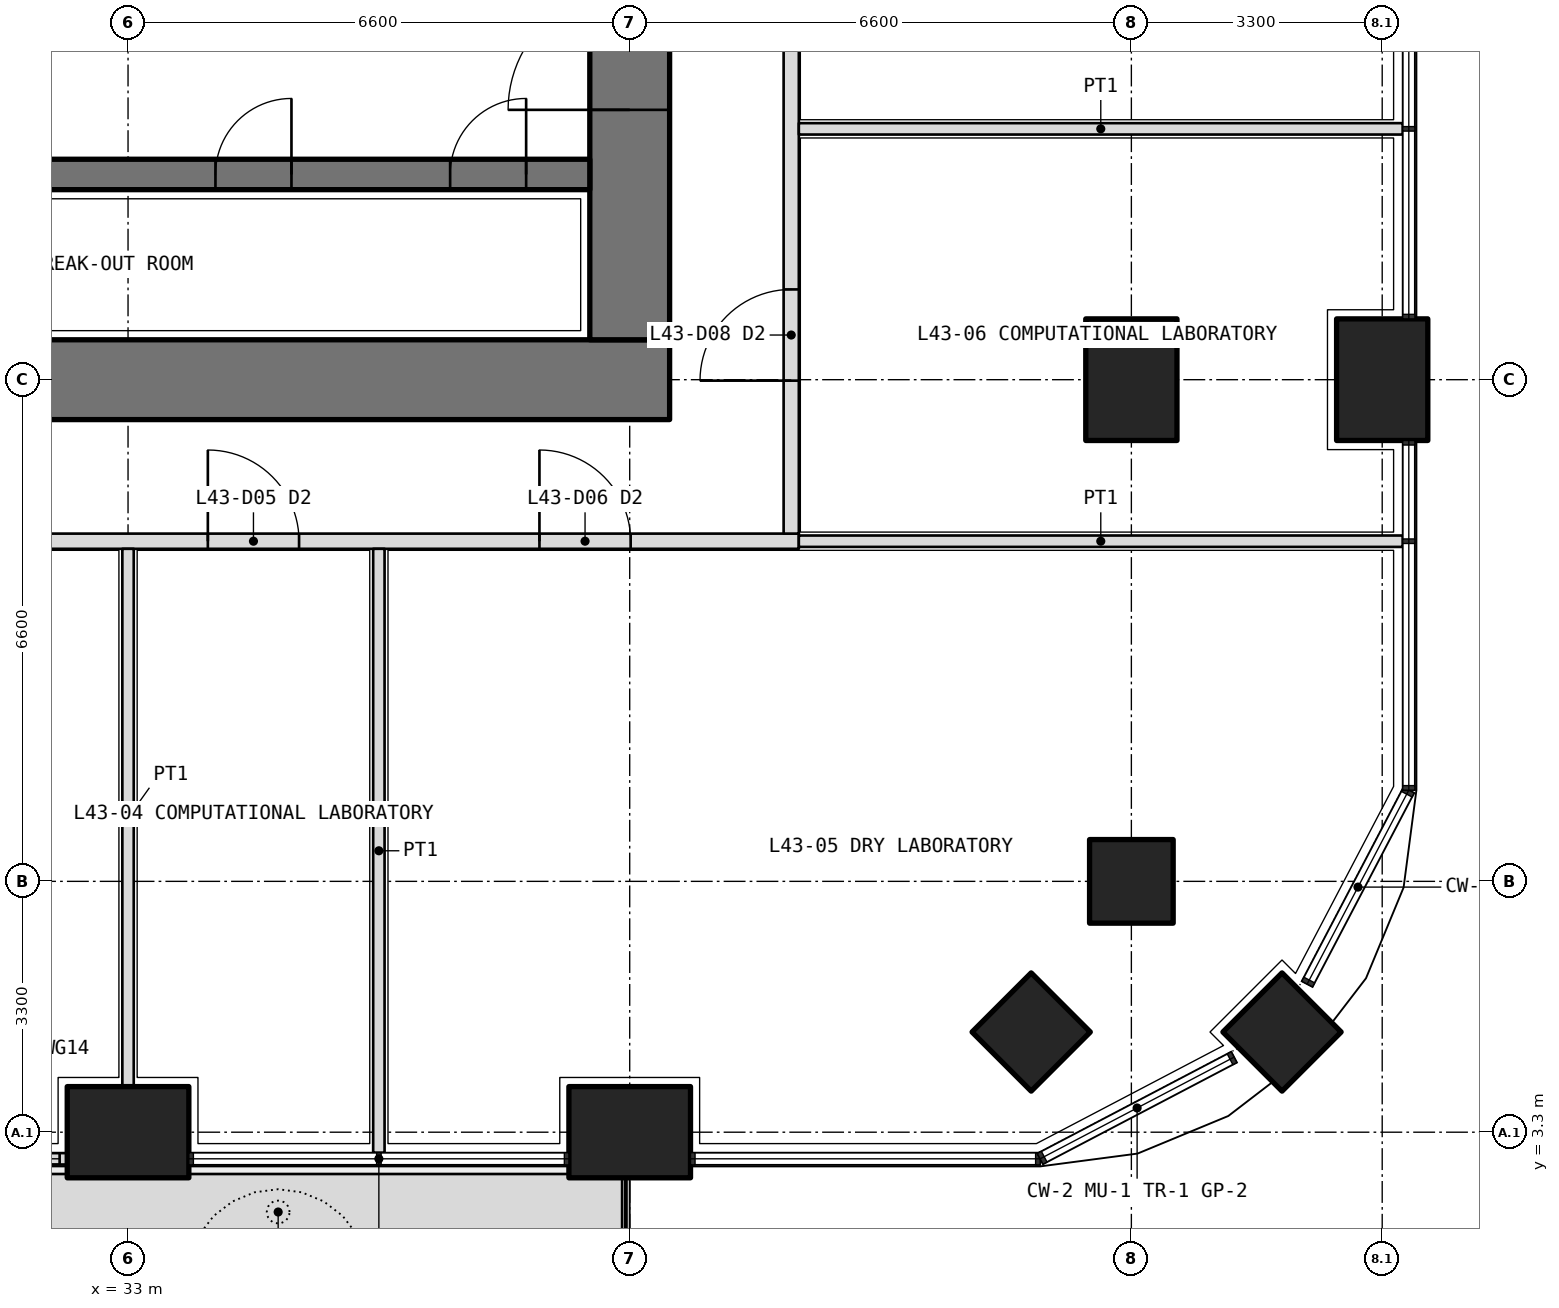
"""IFC4 building model, lengths in metres.
Left out: names, types, materials, properties, quantities, classifications, styles, units other than length and angle.
Written with IfcOpenShell. Run it as: python <this file> out.ifc"""

import sys

from ifc_helpers import new_model, si_unit, direction, frame, frame_2d, origin, origin_2d, place, context, subcontext, project, spatial, polyline, rectangle, outline, extrude, element, fill, save


model = new_model("IFC4")
c1 = context("Model", 3, precision=1e-05, world=origin(), true_north=direction((0.0, 1.0)))
c2 = subcontext(c1, "Body", "Model", "MODEL_VIEW")
j1 = project(units=[si_unit("LENGTHUNIT", "METRE"), si_unit("PLANEANGLEUNIT", "RADIAN")], contexts=[c1])
p1 = place(None, origin())
s1 = spatial("IfcSite", under=j1, at=p1, CompositionType="ELEMENT")
p2 = place(p1, origin())
s2 = spatial("IfcBuilding", under=s1, at=p2, CompositionType="ELEMENT")
p3 = place(p2, frame((0.0, 0.0, 189.3)))
s3 = spatial("IfcBuildingStorey", under=s2, at=p3, CompositionType="ELEMENT", Elevation=189.3)
p4 = place(p3, frame((48.182, 4.618, 0.0), z_axis=(0.0, 0.0, 1.0), x_axis=(0.707106781187, 0.707106781187, 0.0)))
e1 = element("IfcColumn", 1, at=p4, inside=s3, PredefinedType="COLUMN", context=c2, shape_type="SweptSolid", body=[
    extrude(rectangle(XDim=1.1, YDim=1.1, at=origin_2d()), origin(), (0.0, 0.0, 1.0), 4.2),
])
for number, where, z_axis, x_axis in (
    (2, (33.0, 3.3, 0.0), (0.0, 0.0, 1.0), (1.0, 0.0, 0.0)),
    (3, (39.6, 3.3, 0.0), (0.0, 0.0, 1.0), (1.0, 0.0, 0.0)),
    (4, (49.5, 13.2, 0.0), (0.0, 0.0, 1.0), (0.0, 1.0, 0.0)),
):
    element("IfcColumn", number, at=place(p3, frame(where, z_axis=z_axis, x_axis=x_axis)), inside=s3, PredefinedType="COLUMN", context=c2, shape_type="SweptSolid", body=[
        extrude(rectangle(XDim=1.6, YDim=1.2, at=origin_2d()), origin(), (0.0, 0.0, 1.0), 4.2),
    ])
for number, where, z_axis, x_axis in (
    (5, (46.2, 6.6, 0.0), (0.0, 0.0, 1.0), (1.0, 0.0, 0.0)),
    (6, (44.882, 4.618, 0.0), (0.0, 0.0, 1.0), (0.707, 0.707, 0.0)),
):
    element("IfcColumn", number, at=place(p3, frame(where, z_axis=z_axis, x_axis=x_axis)), inside=s3, PredefinedType="COLUMN", context=c2, shape_type="SweptSolid", body=[
        extrude(rectangle(XDim=1.1, YDim=1.1, at=origin_2d()), origin(), (0.0, 0.0, 1.0), 4.2),
    ])
p5 = place(p3, frame((46.2, 13.2, 0.0), z_axis=(0.0, 0.0, 1.0), x_axis=(0.0, 1.0, 0.0)))
e7 = element("IfcColumn", 7, at=p5, inside=s3, PredefinedType="COLUMN", context=c2, shape_type="SweptSolid", body=[
    extrude(rectangle(XDim=1.6, YDim=1.2, at=origin_2d()), origin(), (0.0, 0.0, 1.0), 4.2),
])
p6 = place(p3, origin())
e8 = element("IfcWall", 8, at=p6, inside=s3, PredefinedType="USERDEFINED", context=c2, shape_type="SweptSolid", body=[
    extrude(outline(polyline([(30.45, 1.75), (39.5, 1.75), (39.5, 2.75), (30.45, 2.75), (30.45, 1.75)]), holes=[polyline([(30.6, 1.9), (39.35, 1.9), (39.35, 2.6), (30.6, 2.6), (30.6, 1.9)])]), origin(), (0.0, 0.0, 1.0), 1.05),
])
p7 = place(p3, frame((27.2, 2.95, 0.0), z_axis=(0.0, 0.0, 1.0), x_axis=(1.0, 0.0, 0.0)))
e9 = element("IfcWall", 9, at=p7, inside=s3, PredefinedType="SOLIDWALL", context=c2, shape_type="SweptSolid", body=[
    extrude(rectangle(XDim=5.0, YDim=0.15, at=frame_2d((2.5, 0.0))), origin(), (0.0, 0.0, 1.0), 2.7),
])
p8 = place(p7, frame((2.75, 0.0, 0.0)))
e10 = element("IfcOpeningElement", 10, at=p8, cuts=e9, PredefinedType="OPENING", context=c2, shape_type="SweptSolid", body=[
    extrude(rectangle(XDim=1.0, YDim=2.4, at=frame_2d((0.5, 1.2))), frame((0.0, 0.085, 0.0), z_axis=(0.0, -1.0, 0.0), x_axis=(1.0, 0.0, 0.0)), (0.0, 0.0, 1.0), 0.17),
])
p9 = place(p7, frame((0.1, 0.0, 0.1)))
e11 = element("IfcOpeningElement", 11, at=p9, cuts=e9, PredefinedType="OPENING", context=c2, shape_type="SweptSolid", body=[
    extrude(rectangle(XDim=2.15, YDim=2.3, at=frame_2d((1.075, 1.15))), frame((0.0, 0.085, 0.0), z_axis=(0.0, -1.0, 0.0), x_axis=(1.0, 0.0, 0.0)), (0.0, 0.0, 1.0), 0.17),
])
p10 = place(p7, frame((3.85, 0.0, 0.1)))
e12 = element("IfcOpeningElement", 12, at=p10, cuts=e9, PredefinedType="OPENING", context=c2, shape_type="SweptSolid", body=[
    extrude(rectangle(XDim=1.05, YDim=2.3, at=frame_2d((0.525, 1.15))), frame((0.0, 0.085, 0.0), z_axis=(0.0, -1.0, 0.0), x_axis=(1.0, 0.0, 0.0)), (0.0, 0.0, 1.0), 0.17),
])
p11 = place(p3, frame((12.675, 13.2, 0.0), z_axis=(0.0, 0.0, 1.0), x_axis=(1.0, 0.0, 0.0)))
e13 = element("IfcWall", 13, at=p11, inside=s3, PredefinedType="SHEAR", context=c2, shape_type="SweptSolid", body=[
    extrude(rectangle(XDim=27.45, YDim=1.05, at=frame_2d((13.725, 0.0))), origin(), (0.0, 0.0, 1.0), 4.2),
])
p12 = place(p3, frame((39.6, 13.725, 0.0), z_axis=(0.0, 0.0, 1.0), x_axis=(0.0, 1.0, 0.0)))
e14 = element("IfcWall", 14, at=p12, inside=s3, PredefinedType="SHEAR", context=c2, shape_type="SweptSolid", body=[
    extrude(rectangle(XDim=18.75, YDim=1.05, at=frame_2d((9.375, 0.0))), origin(), (0.0, 0.0, 1.0), 4.2),
])
p13 = place(p12, frame((3.025, 0.0, 0.0)))
e15 = element("IfcOpeningElement", 15, at=p13, cuts=e14, PredefinedType="OPENING", context=c2, shape_type="SweptSolid", body=[
    extrude(rectangle(XDim=1.6, YDim=2.1, at=frame_2d((0.8, 1.05))), frame((0.0, 0.535, 0.0), z_axis=(0.0, -1.0, 0.0), x_axis=(1.0, 0.0, 0.0)), (0.0, 0.0, 1.0), 1.07),
])
p14 = place(p12, frame((13.825, 0.0, 0.0)))
e16 = element("IfcOpeningElement", 16, at=p14, cuts=e14, PredefinedType="OPENING", context=c2, shape_type="SweptSolid", body=[
    extrude(rectangle(XDim=1.6, YDim=2.1, at=frame_2d((0.8, 1.05))), frame((0.0, 0.535, 0.0), z_axis=(0.0, -1.0, 0.0), x_axis=(1.0, 0.0, 0.0)), (0.0, 0.0, 1.0), 1.07),
])
p15 = place(p3, frame((13.725, 15.9, 0.0), z_axis=(0.0, 0.0, 1.0), x_axis=(1.0, 0.0, 0.0)))
e17 = element("IfcWall", 17, at=p15, inside=s3, PredefinedType="SHEAR", context=c2, shape_type="SweptSolid", body=[
    extrude(rectangle(XDim=25.35, YDim=0.4, at=frame_2d((12.675, 0.0))), origin(), (0.0, 0.0, 1.0), 4.2),
])
p16 = place(p15, frame((0.837, 0.0, 0.0)))
e18 = element("IfcOpeningElement", 18, at=p16, cuts=e17, PredefinedType="OPENING", context=c2, shape_type="SweptSolid", body=[
    extrude(rectangle(XDim=1.0, YDim=2.1, at=frame_2d((0.5, 1.05))), frame((0.0, 0.21, 0.0), z_axis=(0.0, -1.0, 0.0), x_axis=(1.0, 0.0, 0.0)), (0.0, 0.0, 1.0), 0.42),
])
p17 = place(p15, frame((3.925, 0.0, 0.0)))
e19 = element("IfcOpeningElement", 19, at=p17, cuts=e17, PredefinedType="OPENING", context=c2, shape_type="SweptSolid", body=[
    extrude(rectangle(XDim=1.0, YDim=2.1, at=frame_2d((0.5, 1.05))), frame((0.0, 0.21, 0.0), z_axis=(0.0, -1.0, 0.0), x_axis=(1.0, 0.0, 0.0)), (0.0, 0.0, 1.0), 0.42),
])
p18 = place(p15, frame((7.225, 0.0, 0.0)))
e20 = element("IfcOpeningElement", 20, at=p18, cuts=e17, PredefinedType="OPENING", context=c2, shape_type="SweptSolid", body=[
    extrude(rectangle(XDim=1.0, YDim=2.1, at=frame_2d((0.5, 1.05))), frame((0.0, 0.21, 0.0), z_axis=(0.0, -1.0, 0.0), x_axis=(1.0, 0.0, 0.0)), (0.0, 0.0, 1.0), 0.42),
])
p19 = place(p15, frame((10.525, 0.0, 0.0)))
e21 = element("IfcOpeningElement", 21, at=p19, cuts=e17, PredefinedType="OPENING", context=c2, shape_type="SweptSolid", body=[
    extrude(rectangle(XDim=1.0, YDim=2.1, at=frame_2d((0.5, 1.05))), frame((0.0, 0.21, 0.0), z_axis=(0.0, -1.0, 0.0), x_axis=(1.0, 0.0, 0.0)), (0.0, 0.0, 1.0), 0.42),
])
p20 = place(p15, frame((13.825, 0.0, 0.0)))
e22 = element("IfcOpeningElement", 22, at=p20, cuts=e17, PredefinedType="OPENING", context=c2, shape_type="SweptSolid", body=[
    extrude(rectangle(XDim=1.0, YDim=2.1, at=frame_2d((0.5, 1.05))), frame((0.0, 0.21, 0.0), z_axis=(0.0, -1.0, 0.0), x_axis=(1.0, 0.0, 0.0)), (0.0, 0.0, 1.0), 0.42),
])
p21 = place(p15, frame((17.125, 0.0, 0.0)))
e23 = element("IfcOpeningElement", 23, at=p21, cuts=e17, PredefinedType="OPENING", context=c2, shape_type="SweptSolid", body=[
    extrude(rectangle(XDim=1.0, YDim=2.1, at=frame_2d((0.5, 1.05))), frame((0.0, 0.21, 0.0), z_axis=(0.0, -1.0, 0.0), x_axis=(1.0, 0.0, 0.0)), (0.0, 0.0, 1.0), 0.42),
])
p22 = place(p15, frame((20.425, 0.0, 0.0)))
e24 = element("IfcOpeningElement", 24, at=p22, cuts=e17, PredefinedType="OPENING", context=c2, shape_type="SweptSolid", body=[
    extrude(rectangle(XDim=1.0, YDim=2.1, at=frame_2d((0.5, 1.05))), frame((0.0, 0.21, 0.0), z_axis=(0.0, -1.0, 0.0), x_axis=(1.0, 0.0, 0.0)), (0.0, 0.0, 1.0), 0.42),
])
p23 = place(p15, frame((23.512, 0.0, 0.0)))
e25 = element("IfcOpeningElement", 25, at=p23, cuts=e17, PredefinedType="OPENING", context=c2, shape_type="SweptSolid", body=[
    extrude(rectangle(XDim=1.0, YDim=2.1, at=frame_2d((0.5, 1.05))), frame((0.0, 0.21, 0.0), z_axis=(0.0, -1.0, 0.0), x_axis=(1.0, 0.0, 0.0)), (0.0, 0.0, 1.0), 0.42),
])
p24 = place(p3, frame((10.975, 11.075, 0.0), z_axis=(0.0, 0.0, 1.0), x_axis=(1.0, 0.0, 0.0)))
e26 = element("IfcWall", 26, at=p24, inside=s3, PredefinedType="PARTITIONING", context=c2, shape_type="SweptSolid", body=[
    extrude(rectangle(XDim=30.85, YDim=0.2, at=frame_2d((15.425, 0.0))), origin(), (0.0, 0.0, 1.0), 2.85),
])
p25 = place(p24, frame((3.863, 0.0, 0.0)))
e27 = element("IfcOpeningElement", 27, at=p25, cuts=e26, PredefinedType="OPENING", context=c2, shape_type="SweptSolid", body=[
    extrude(rectangle(XDim=1.2, YDim=2.1, at=frame_2d((0.6, 1.05))), frame((0.0, 0.11, 0.0), z_axis=(0.0, -1.0, 0.0), x_axis=(1.0, 0.0, 0.0)), (0.0, 0.0, 1.0), 0.22),
])
p26 = place(p24, frame((11.525, 0.0, 0.0)))
e28 = element("IfcOpeningElement", 28, at=p26, cuts=e26, PredefinedType="OPENING", context=c2, shape_type="SweptSolid", body=[
    extrude(rectangle(XDim=1.2, YDim=2.1, at=frame_2d((0.6, 1.05))), frame((0.0, 0.11, 0.0), z_axis=(0.0, -1.0, 0.0), x_axis=(1.0, 0.0, 0.0)), (0.0, 0.0, 1.0), 0.22),
])
p27 = place(p24, frame((18.125, 0.0, 0.0)))
e29 = element("IfcOpeningElement", 29, at=p27, cuts=e26, PredefinedType="OPENING", context=c2, shape_type="SweptSolid", body=[
    extrude(rectangle(XDim=1.2, YDim=2.1, at=frame_2d((0.6, 1.05))), frame((0.0, 0.11, 0.0), z_axis=(0.0, -1.0, 0.0), x_axis=(1.0, 0.0, 0.0)), (0.0, 0.0, 1.0), 0.22),
])
p28 = place(p24, frame((23.075, 0.0, 0.0)))
e30 = element("IfcOpeningElement", 30, at=p28, cuts=e26, PredefinedType="OPENING", context=c2, shape_type="SweptSolid", body=[
    extrude(rectangle(XDim=1.2, YDim=2.1, at=frame_2d((0.6, 1.05))), frame((0.0, 0.11, 0.0), z_axis=(0.0, -1.0, 0.0), x_axis=(1.0, 0.0, 0.0)), (0.0, 0.0, 1.0), 0.22),
])
p29 = place(p24, frame((27.438, 0.0, 0.0)))
e31 = element("IfcOpeningElement", 31, at=p29, cuts=e26, PredefinedType="OPENING", context=c2, shape_type="SweptSolid", body=[
    extrude(rectangle(XDim=1.2, YDim=2.1, at=frame_2d((0.6, 1.05))), frame((0.0, 0.11, 0.0), z_axis=(0.0, -1.0, 0.0), x_axis=(1.0, 0.0, 0.0)), (0.0, 0.0, 1.0), 0.22),
])
p30 = place(p3, frame((41.725, 11.175, 0.0), z_axis=(0.0, 0.0, 1.0), x_axis=(0.0, 1.0, 0.0)))
e32 = element("IfcWall", 32, at=p30, inside=s3, PredefinedType="PARTITIONING", context=c2, shape_type="SweptSolid", body=[
    extrude(rectangle(XDim=23.85, YDim=0.2, at=frame_2d((11.925, 0.0))), origin(), (0.0, 0.0, 1.0), 2.85),
])
p31 = place(p30, frame((2.012, 0.0, 0.0)))
e33 = element("IfcOpeningElement", 33, at=p31, cuts=e32, PredefinedType="OPENING", context=c2, shape_type="SweptSolid", body=[
    extrude(rectangle(XDim=1.2, YDim=2.1, at=frame_2d((0.6, 1.05))), frame((0.0, 0.11, 0.0), z_axis=(0.0, -1.0, 0.0), x_axis=(1.0, 0.0, 0.0)), (0.0, 0.0, 1.0), 0.22),
])
p32 = place(p30, frame((6.375, 0.0, 0.0)))
e34 = element("IfcOpeningElement", 34, at=p32, cuts=e32, PredefinedType="OPENING", context=c2, shape_type="SweptSolid", body=[
    extrude(rectangle(XDim=1.2, YDim=2.1, at=frame_2d((0.6, 1.05))), frame((0.0, 0.11, 0.0), z_axis=(0.0, -1.0, 0.0), x_axis=(1.0, 0.0, 0.0)), (0.0, 0.0, 1.0), 0.22),
])
p33 = place(p30, frame((9.625, 0.0, 0.0)))
e35 = element("IfcOpeningElement", 35, at=p33, cuts=e32, PredefinedType="OPENING", context=c2, shape_type="SweptSolid", body=[
    extrude(rectangle(XDim=1.0, YDim=2.1, at=frame_2d((0.5, 1.05))), frame((0.0, 0.11, 0.0), z_axis=(0.0, -1.0, 0.0), x_axis=(1.0, 0.0, 0.0)), (0.0, 0.0, 1.0), 0.22),
])
p34 = place(p30, frame((12.975, 0.0, 0.0)))
e36 = element("IfcOpeningElement", 36, at=p34, cuts=e32, PredefinedType="OPENING", context=c2, shape_type="SweptSolid", body=[
    extrude(rectangle(XDim=0.9, YDim=2.1, at=frame_2d((0.45, 1.05))), frame((0.0, 0.11, 0.0), z_axis=(0.0, -1.0, 0.0), x_axis=(1.0, 0.0, 0.0)), (0.0, 0.0, 1.0), 0.22),
])
p35 = place(p30, frame((16.375, 0.0, 0.0)))
e37 = element("IfcOpeningElement", 37, at=p35, cuts=e32, PredefinedType="OPENING", context=c2, shape_type="SweptSolid", body=[
    extrude(rectangle(XDim=1.0, YDim=2.1, at=frame_2d((0.5, 1.05))), frame((0.0, 0.11, 0.0), z_axis=(0.0, -1.0, 0.0), x_axis=(1.0, 0.0, 0.0)), (0.0, 0.0, 1.0), 0.22),
])
p36 = place(p30, frame((20.637, 0.0, 0.0)))
e38 = element("IfcOpeningElement", 38, at=p36, cuts=e32, PredefinedType="OPENING", context=c2, shape_type="SweptSolid", body=[
    extrude(rectangle(XDim=1.2, YDim=2.1, at=frame_2d((0.6, 1.05))), frame((0.0, 0.11, 0.0), z_axis=(0.0, -1.0, 0.0), x_axis=(1.0, 0.0, 0.0)), (0.0, 0.0, 1.0), 0.22),
])
p37 = place(p3, frame((49.77, 11.075, 0.0), z_axis=(0.0, 0.0, 1.0), x_axis=(-1.0, 0.0, 0.0)))
e39 = element("IfcWall", 39, at=p37, inside=s3, PredefinedType="PARTITIONING", context=c2, shape_type="SweptSolid", body=[
    extrude(rectangle(XDim=7.945, YDim=0.15, at=frame_2d((3.973, 0.0))), origin(), (0.0, 0.0, 1.0), 2.7),
])
p38 = place(p3, frame((33.0, 3.9, 0.0), z_axis=(0.0, 0.0, 1.0), x_axis=(0.0, 1.0, 0.0)))
e40 = element("IfcWall", 40, at=p38, inside=s3, PredefinedType="PARTITIONING", context=c2, shape_type="SweptSolid", body=[
    extrude(rectangle(XDim=7.075, YDim=0.15, at=frame_2d((3.538, 0.0))), origin(), (0.0, 0.0, 1.0), 2.85),
])
for number, where, z_axis, x_axis in (
    (41, (36.3, 3.03, 0.0), (0.0, 0.0, 1.0), (0.0, 1.0, 0.0)),
    (42, (49.77, 16.5, 0.0), (0.0, 0.0, 1.0), (-1.0, 0.0, 0.0)),
):
    element("IfcWall", number, at=place(p3, frame(where, z_axis=z_axis, x_axis=x_axis)), inside=s3, PredefinedType="PARTITIONING", context=c2, shape_type="SweptSolid", body=[
        extrude(rectangle(XDim=7.945, YDim=0.15, at=frame_2d((3.973, 0.0))), origin(), (0.0, 0.0, 1.0), 2.7),
    ])
p39 = place(p10, origin())
e43 = element("IfcWindow", 43, at=p39, inside=s3, PartitioningType="SINGLE_PANEL", PredefinedType="WINDOW", context=c2, shape_type="SweptSolid", body=[
    extrude(rectangle(XDim=1.05, YDim=2.3, at=frame_2d((0.525, 1.15))), frame((0.0, 0.03, 0.0), z_axis=(0.0, -1.0, 0.0), x_axis=(1.0, 0.0, 0.0)), (0.0, 0.0, 1.0), 0.06),
])
fill(e12, e43)
p40 = place(p28, origin())
e44 = element("IfcDoor", 44, at=p40, inside=s3, OperationType="DOUBLE_DOOR_SINGLE_SWING", PredefinedType="DOOR", context=c2, shape_type="SweptSolid", body=[
    extrude(rectangle(XDim=1.2, YDim=2.1, at=frame_2d((0.6, 1.05))), frame((0.0, 0.025, 0.0), z_axis=(0.0, -1.0, 0.0), x_axis=(1.0, 0.0, 0.0)), (0.0, 0.0, 1.0), 0.05),
])
fill(e30, e44)
p41 = place(p29, origin())
e45 = element("IfcDoor", 45, at=p41, inside=s3, OperationType="DOUBLE_DOOR_SINGLE_SWING", PredefinedType="DOOR", context=c2, shape_type="SweptSolid", body=[
    extrude(rectangle(XDim=1.2, YDim=2.1, at=frame_2d((0.6, 1.05))), frame((0.0, 0.025, 0.0), z_axis=(0.0, -1.0, 0.0), x_axis=(1.0, 0.0, 0.0)), (0.0, 0.0, 1.0), 0.05),
])
fill(e31, e45)
p42 = place(p31, origin())
e46 = element("IfcDoor", 46, at=p42, inside=s3, OperationType="DOUBLE_DOOR_SINGLE_SWING", PredefinedType="DOOR", context=c2, shape_type="SweptSolid", body=[
    extrude(rectangle(XDim=1.2, YDim=2.1, at=frame_2d((0.6, 1.05))), frame((0.0, 0.025, 0.0), z_axis=(0.0, -1.0, 0.0), x_axis=(1.0, 0.0, 0.0)), (0.0, 0.0, 1.0), 0.05),
])
fill(e33, e46)
p43 = place(p22, origin())
e47 = element("IfcDoor", 47, at=p43, inside=s3, OperationType="SINGLE_SWING_RIGHT", PredefinedType="DOOR", context=c2, shape_type="SweptSolid", body=[
    extrude(rectangle(XDim=1.0, YDim=2.1, at=frame_2d((0.5, 1.05))), frame((0.0, 0.025, 0.0), z_axis=(0.0, -1.0, 0.0), x_axis=(1.0, 0.0, 0.0)), (0.0, 0.0, 1.0), 0.05),
])
fill(e24, e47)
p44 = place(p23, origin())
e48 = element("IfcDoor", 48, at=p44, inside=s3, OperationType="SINGLE_SWING_RIGHT", PredefinedType="DOOR", context=c2, shape_type="SweptSolid", body=[
    extrude(rectangle(XDim=1.0, YDim=2.1, at=frame_2d((0.5, 1.05))), frame((0.0, 0.025, 0.0), z_axis=(0.0, -1.0, 0.0), x_axis=(1.0, 0.0, 0.0)), (0.0, 0.0, 1.0), 0.05),
])
fill(e25, e48)
p45 = place(p13, origin())
e49 = element("IfcDoor", 49, at=p45, inside=s3, OperationType="DOUBLE_DOOR_DOUBLE_SWING", PredefinedType="DOOR", context=c2, shape_type="SweptSolid", body=[
    extrude(rectangle(XDim=1.6, YDim=2.1, at=frame_2d((0.8, 1.05))), frame((0.0, 0.025, 0.0), z_axis=(0.0, -1.0, 0.0), x_axis=(1.0, 0.0, 0.0)), (0.0, 0.0, 1.0), 0.05),
])
fill(e15, e49)
save(model, sys.argv[1])
